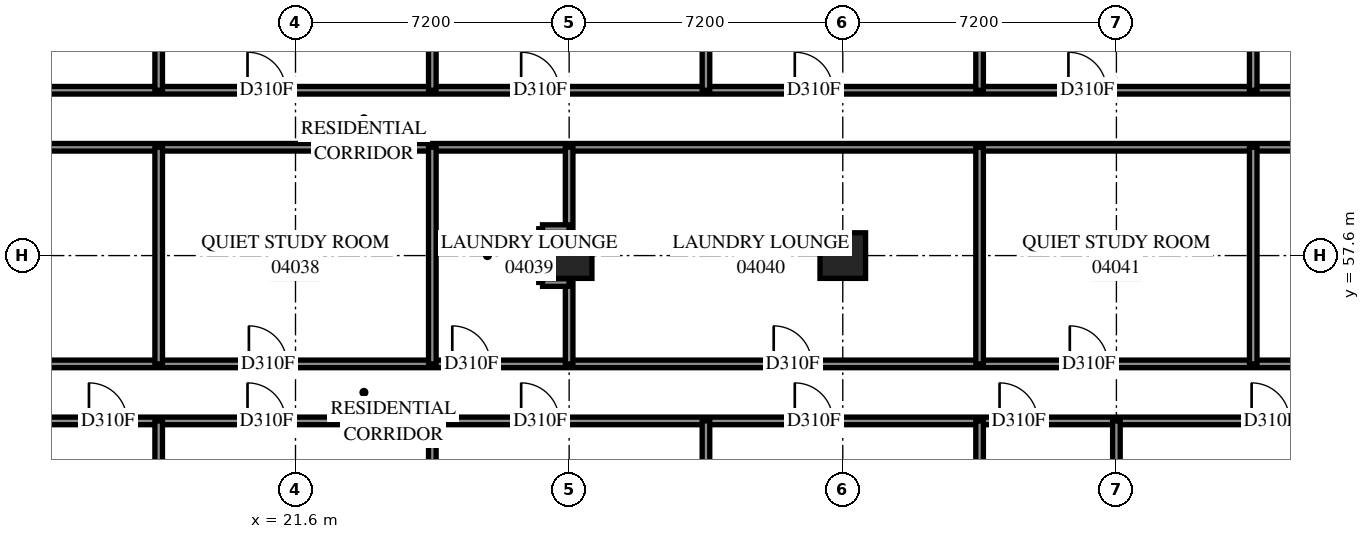
"""IFC4 building model, lengths in metres.
Left out: names, types, materials, properties, quantities, classifications, styles, units other than length and angle.
Written with IfcOpenShell. Run it as: python <this file> out.ifc"""

import sys

from ifc_helpers import new_model, si_unit, direction, frame, frame_2d, origin, origin_2d, place, context, subcontext, project, spatial, rectangle, extrude, element, fill, save


model = new_model("IFC4")
c1 = context("Model", 3, precision=1e-05, world=origin(), true_north=direction((0.0, 1.0)))
c2 = subcontext(c1, "Body", "Model", "MODEL_VIEW")
j1 = project(units=[si_unit("LENGTHUNIT", "METRE"), si_unit("PLANEANGLEUNIT", "RADIAN")], contexts=[c1])
p1 = place(None, origin())
s1 = spatial("IfcSite", under=j1, at=p1, CompositionType="ELEMENT")
p2 = place(p1, origin())
s2 = spatial("IfcBuilding", under=s1, at=p2, CompositionType="ELEMENT")
p3 = place(p2, frame((0.0, 0.0, 18.6)))
s3 = spatial("IfcBuildingStorey", under=s2, at=p3, CompositionType="ELEMENT", Elevation=18.6)
for number, where, z_axis, x_axis in (
    (1, (21.6, 57.6, 0.0), (0.0, 0.0, 1.0), (1.0, 0.0, 0.0)),
    (2, (28.8, 57.6, 0.0), (0.0, 0.0, 1.0), (1.0, 0.0, 0.0)),
    (3, (36.0, 57.6, 0.0), (0.0, 0.0, 1.0), (1.0, 0.0, 0.0)),
    (4, (43.2, 57.6, 0.0), (0.0, 0.0, 1.0), (1.0, 0.0, 0.0)),
):
    element("IfcColumn", number, at=place(p3, frame(where, z_axis=z_axis, x_axis=x_axis)), inside=s3, PredefinedType="COLUMN", context=c2, shape_type="SweptSolid", body=[
        extrude(rectangle(XDim=1.2, YDim=1.2, at=origin_2d()), origin(), (0.0, 0.0, 1.0), 3.8),
    ])
p4 = place(p3, frame((0.0, 53.25, 0.0), z_axis=(0.0, 0.0, 1.0), x_axis=(1.0, 0.0, 0.0)))
e5 = element("IfcWall", 5, at=p4, inside=s3, PredefinedType="PARTITIONING", context=c2, shape_type="SweptSolid", body=[
    extrude(rectangle(XDim=55.1, YDim=0.2, at=frame_2d((27.55, 0.0))), origin(), (0.0, 0.0, 1.0), 3.8),
])
p5 = place(p4, frame((8.669, 0.0, 0.0)))
e6 = element("IfcOpeningElement", 6, at=p5, cuts=e5, PredefinedType="OPENING", context=c2, shape_type="SweptSolid", body=[
    extrude(rectangle(XDim=1.0, YDim=2.1, at=frame_2d((0.5, 1.05))), frame((0.0, 0.11, 0.0), z_axis=(0.0, -1.0, 0.0), x_axis=(1.0, 0.0, 0.0)), (0.0, 0.0, 1.0), 0.22),
])
p6 = place(p4, frame((11.635, 0.0, 0.0)))
e7 = element("IfcOpeningElement", 7, at=p6, cuts=e5, PredefinedType="OPENING", context=c2, shape_type="SweptSolid", body=[
    extrude(rectangle(XDim=1.0, YDim=2.1, at=frame_2d((0.5, 1.05))), frame((0.0, 0.11, 0.0), z_axis=(0.0, -1.0, 0.0), x_axis=(1.0, 0.0, 0.0)), (0.0, 0.0, 1.0), 0.22),
])
p7 = place(p4, frame((16.165, 0.0, 0.0)))
e8 = element("IfcOpeningElement", 8, at=p7, cuts=e5, PredefinedType="OPENING", context=c2, shape_type="SweptSolid", body=[
    extrude(rectangle(XDim=1.0, YDim=2.1, at=frame_2d((0.5, 1.05))), frame((0.0, 0.11, 0.0), z_axis=(0.0, -1.0, 0.0), x_axis=(1.0, 0.0, 0.0)), (0.0, 0.0, 1.0), 0.22),
])
p8 = place(p4, frame((20.337, 0.0, 0.0)))
e9 = element("IfcOpeningElement", 9, at=p8, cuts=e5, PredefinedType="OPENING", context=c2, shape_type="SweptSolid", body=[
    extrude(rectangle(XDim=1.0, YDim=2.1, at=frame_2d((0.5, 1.05))), frame((0.0, 0.11, 0.0), z_axis=(0.0, -1.0, 0.0), x_axis=(1.0, 0.0, 0.0)), (0.0, 0.0, 1.0), 0.22),
])
p9 = place(p4, frame((27.538, 0.0, 0.0)))
e10 = element("IfcOpeningElement", 10, at=p9, cuts=e5, PredefinedType="OPENING", context=c2, shape_type="SweptSolid", body=[
    extrude(rectangle(XDim=1.0, YDim=2.1, at=frame_2d((0.5, 1.05))), frame((0.0, 0.11, 0.0), z_axis=(0.0, -1.0, 0.0), x_axis=(1.0, 0.0, 0.0)), (0.0, 0.0, 1.0), 0.22),
])
p10 = place(p4, frame((34.737, 0.0, 0.0)))
e11 = element("IfcOpeningElement", 11, at=p10, cuts=e5, PredefinedType="OPENING", context=c2, shape_type="SweptSolid", body=[
    extrude(rectangle(XDim=1.0, YDim=2.1, at=frame_2d((0.5, 1.05))), frame((0.0, 0.11, 0.0), z_axis=(0.0, -1.0, 0.0), x_axis=(1.0, 0.0, 0.0)), (0.0, 0.0, 1.0), 0.22),
])
p11 = place(p4, frame((40.125, 0.0, 0.0)))
e12 = element("IfcOpeningElement", 12, at=p11, cuts=e5, PredefinedType="OPENING", context=c2, shape_type="SweptSolid", body=[
    extrude(rectangle(XDim=1.0, YDim=2.1, at=frame_2d((0.5, 1.05))), frame((0.0, 0.11, 0.0), z_axis=(0.0, -1.0, 0.0), x_axis=(1.0, 0.0, 0.0)), (0.0, 0.0, 1.0), 0.22),
])
p12 = place(p4, frame((46.758, 0.0, 0.0)))
e13 = element("IfcOpeningElement", 13, at=p12, cuts=e5, PredefinedType="OPENING", context=c2, shape_type="SweptSolid", body=[
    extrude(rectangle(XDim=1.0, YDim=2.1, at=frame_2d((0.5, 1.05))), frame((0.0, 0.11, 0.0), z_axis=(0.0, -1.0, 0.0), x_axis=(1.0, 0.0, 0.0)), (0.0, 0.0, 1.0), 0.22),
])
p13 = place(p4, frame((53.913, 0.0, 0.0)))
e14 = element("IfcOpeningElement", 14, at=p13, cuts=e5, PredefinedType="OPENING", context=c2, shape_type="SweptSolid", body=[
    extrude(rectangle(XDim=1.0, YDim=2.1, at=frame_2d((0.5, 1.05))), frame((0.0, 0.11, 0.0), z_axis=(0.0, -1.0, 0.0), x_axis=(1.0, 0.0, 0.0)), (0.0, 0.0, 1.0), 0.22),
])
p14 = place(p4, frame((2.672, 0.0, 0.0)))
e15 = element("IfcOpeningElement", 15, at=p14, cuts=e5, PredefinedType="OPENING", context=c2, shape_type="SweptSolid", body=[
    extrude(rectangle(XDim=1.0, YDim=2.1, at=frame_2d((0.5, 1.05))), frame((0.0, 0.11, 0.0), z_axis=(0.0, -1.0, 0.0), x_axis=(1.0, 0.0, 0.0)), (0.0, 0.0, 1.0), 0.22),
])
p15 = place(p4, frame((4.788, 0.0, 0.0)))
e16 = element("IfcOpeningElement", 16, at=p15, cuts=e5, PredefinedType="OPENING", context=c2, shape_type="SweptSolid", body=[
    extrude(rectangle(XDim=1.0, YDim=2.1, at=frame_2d((0.5, 1.05))), frame((0.0, 0.11, 0.0), z_axis=(0.0, -1.0, 0.0), x_axis=(1.0, 0.0, 0.0)), (0.0, 0.0, 1.0), 0.22),
])
p16 = place(p3, frame((0.002, 60.45, 0.0), z_axis=(0.0, 0.0, 1.0), x_axis=(1.0, 0.0, 0.0)))
e17 = element("IfcWall", 17, at=p16, inside=s3, PredefinedType="PARTITIONING", context=c2, shape_type="SweptSolid", body=[
    extrude(rectangle(XDim=55.098, YDim=0.2, at=frame_2d((27.549, 0.0))), origin(), (0.0, 0.0, 1.0), 3.8),
])
p17 = place(p16, frame((49.69, 0.0, 0.0)))
e18 = element("IfcOpeningElement", 18, at=p17, cuts=e17, PredefinedType="OPENING", context=c2, shape_type="SweptSolid", body=[
    extrude(rectangle(XDim=1.0, YDim=2.1, at=frame_2d((0.5, 1.05))), frame((0.0, 0.11, 0.0), z_axis=(0.0, -1.0, 0.0), x_axis=(1.0, 0.0, 0.0)), (0.0, 0.0, 1.0), 0.22),
])
p18 = place(p16, frame((3.897, 0.0, 0.0)))
e19 = element("IfcOpeningElement", 19, at=p18, cuts=e17, PredefinedType="OPENING", context=c2, shape_type="SweptSolid", body=[
    extrude(rectangle(XDim=1.0, YDim=2.1, at=frame_2d((0.5, 1.05))), frame((0.0, 0.11, 0.0), z_axis=(0.0, -1.0, 0.0), x_axis=(1.0, 0.0, 0.0)), (0.0, 0.0, 1.0), 0.22),
])
p19 = place(p3, frame((0.002, 61.95, 0.0), z_axis=(0.0, 0.0, 1.0), x_axis=(1.0, 0.0, 0.0)))
e20 = element("IfcWall", 20, at=p19, inside=s3, PredefinedType="PARTITIONING", context=c2, shape_type="SweptSolid", body=[
    extrude(rectangle(XDim=55.098, YDim=0.2, at=frame_2d((27.549, 0.0))), origin(), (0.0, 0.0, 1.0), 3.8),
])
p20 = place(p19, frame((8.667, 0.0, 0.0)))
e21 = element("IfcOpeningElement", 21, at=p20, cuts=e20, PredefinedType="OPENING", context=c2, shape_type="SweptSolid", body=[
    extrude(rectangle(XDim=1.0, YDim=2.1, at=frame_2d((0.5, 1.05))), frame((0.0, 0.11, 0.0), z_axis=(0.0, -1.0, 0.0), x_axis=(1.0, 0.0, 0.0)), (0.0, 0.0, 1.0), 0.22),
])
p21 = place(p19, frame((13.136, 0.0, 0.0)))
e22 = element("IfcOpeningElement", 22, at=p21, cuts=e20, PredefinedType="OPENING", context=c2, shape_type="SweptSolid", body=[
    extrude(rectangle(XDim=1.0, YDim=2.1, at=frame_2d((0.5, 1.05))), frame((0.0, 0.11, 0.0), z_axis=(0.0, -1.0, 0.0), x_axis=(1.0, 0.0, 0.0)), (0.0, 0.0, 1.0), 0.22),
])
p22 = place(p19, frame((20.335, 0.0, 0.0)))
e23 = element("IfcOpeningElement", 23, at=p22, cuts=e20, PredefinedType="OPENING", context=c2, shape_type="SweptSolid", body=[
    extrude(rectangle(XDim=1.0, YDim=2.1, at=frame_2d((0.5, 1.05))), frame((0.0, 0.11, 0.0), z_axis=(0.0, -1.0, 0.0), x_axis=(1.0, 0.0, 0.0)), (0.0, 0.0, 1.0), 0.22),
])
p23 = place(p19, frame((27.535, 0.0, 0.0)))
e24 = element("IfcOpeningElement", 24, at=p23, cuts=e20, PredefinedType="OPENING", context=c2, shape_type="SweptSolid", body=[
    extrude(rectangle(XDim=1.0, YDim=2.1, at=frame_2d((0.5, 1.05))), frame((0.0, 0.11, 0.0), z_axis=(0.0, -1.0, 0.0), x_axis=(1.0, 0.0, 0.0)), (0.0, 0.0, 1.0), 0.22),
])
p24 = place(p19, frame((34.736, 0.0, 0.0)))
e25 = element("IfcOpeningElement", 25, at=p24, cuts=e20, PredefinedType="OPENING", context=c2, shape_type="SweptSolid", body=[
    extrude(rectangle(XDim=1.0, YDim=2.1, at=frame_2d((0.5, 1.05))), frame((0.0, 0.11, 0.0), z_axis=(0.0, -1.0, 0.0), x_axis=(1.0, 0.0, 0.0)), (0.0, 0.0, 1.0), 0.22),
])
p25 = place(p19, frame((41.935, 0.0, 0.0)))
e26 = element("IfcOpeningElement", 26, at=p25, cuts=e20, PredefinedType="OPENING", context=c2, shape_type="SweptSolid", body=[
    extrude(rectangle(XDim=1.0, YDim=2.1, at=frame_2d((0.5, 1.05))), frame((0.0, 0.11, 0.0), z_axis=(0.0, -1.0, 0.0), x_axis=(1.0, 0.0, 0.0)), (0.0, 0.0, 1.0), 0.22),
])
p26 = place(p19, frame((49.136, 0.0, 0.0)))
e27 = element("IfcOpeningElement", 27, at=p26, cuts=e20, PredefinedType="OPENING", context=c2, shape_type="SweptSolid", body=[
    extrude(rectangle(XDim=1.0, YDim=2.1, at=frame_2d((0.5, 1.05))), frame((0.0, 0.11, 0.0), z_axis=(0.0, -1.0, 0.0), x_axis=(1.0, 0.0, 0.0)), (0.0, 0.0, 1.0), 0.22),
])
p27 = place(p19, frame((4.799, 0.0, 0.0)))
e28 = element("IfcOpeningElement", 28, at=p27, cuts=e20, PredefinedType="OPENING", context=c2, shape_type="SweptSolid", body=[
    extrude(rectangle(XDim=1.0, YDim=2.1, at=frame_2d((0.5, 1.05))), frame((0.0, 0.11, 0.0), z_axis=(0.0, -1.0, 0.0), x_axis=(1.0, 0.0, 0.0)), (0.0, 0.0, 1.0), 0.22),
])
p28 = place(p3, frame((6.0, 54.75, 0.0), z_axis=(0.0, 0.0, 1.0), x_axis=(1.0, 0.0, 0.0)))
e29 = element("IfcWall", 29, at=p28, inside=s3, PredefinedType="PARTITIONING", context=c2, shape_type="SweptSolid", body=[
    extrude(rectangle(XDim=49.1, YDim=0.2, at=frame_2d((24.55, 0.0))), origin(), (0.0, 0.0, 1.0), 3.8),
])
p29 = place(p28, frame((6.284, 0.0, 0.0)))
e30 = element("IfcOpeningElement", 30, at=p29, cuts=e29, PredefinedType="OPENING", context=c2, shape_type="SweptSolid", body=[
    extrude(rectangle(XDim=1.0, YDim=2.1, at=frame_2d((0.5, 1.05))), frame((0.0, 0.11, 0.0), z_axis=(0.0, -1.0, 0.0), x_axis=(1.0, 0.0, 0.0)), (0.0, 0.0, 1.0), 0.22),
])
p30 = place(p28, frame((14.374, 0.0, 0.0)))
e31 = element("IfcOpeningElement", 31, at=p30, cuts=e29, PredefinedType="OPENING", context=c2, shape_type="SweptSolid", body=[
    extrude(rectangle(XDim=1.0, YDim=2.1, at=frame_2d((0.5, 1.05))), frame((0.0, 0.11, 0.0), z_axis=(0.0, -1.0, 0.0), x_axis=(1.0, 0.0, 0.0)), (0.0, 0.0, 1.0), 0.22),
])
p31 = place(p28, frame((19.725, 0.0, 0.0)))
e32 = element("IfcOpeningElement", 32, at=p31, cuts=e29, PredefinedType="OPENING", context=c2, shape_type="SweptSolid", body=[
    extrude(rectangle(XDim=1.0, YDim=2.1, at=frame_2d((0.5, 1.05))), frame((0.0, 0.11, 0.0), z_axis=(0.0, -1.0, 0.0), x_axis=(1.0, 0.0, 0.0)), (0.0, 0.0, 1.0), 0.22),
])
p32 = place(p28, frame((28.183, 0.0, 0.0)))
e33 = element("IfcOpeningElement", 33, at=p32, cuts=e29, PredefinedType="OPENING", context=c2, shape_type="SweptSolid", body=[
    extrude(rectangle(XDim=1.0, YDim=2.1, at=frame_2d((0.5, 1.05))), frame((0.0, 0.11, 0.0), z_axis=(0.0, -1.0, 0.0), x_axis=(1.0, 0.0, 0.0)), (0.0, 0.0, 1.0), 0.22),
])
p33 = place(p28, frame((35.974, 0.0, 0.0)))
e34 = element("IfcOpeningElement", 34, at=p33, cuts=e29, PredefinedType="OPENING", context=c2, shape_type="SweptSolid", body=[
    extrude(rectangle(XDim=1.0, YDim=2.1, at=frame_2d((0.5, 1.05))), frame((0.0, 0.11, 0.0), z_axis=(0.0, -1.0, 0.0), x_axis=(1.0, 0.0, 0.0)), (0.0, 0.0, 1.0), 0.22),
])
for number, where, z_axis, x_axis in (
    (35, (18.0, 42.0, 0.0), (0.0, 0.0, 1.0), (0.0, 1.0, 0.0)),
    (36, (25.2, 42.0, 0.0), (0.0, 0.0, 1.0), (0.0, 1.0, 0.0)),
    (37, (32.4, 42.0, 0.0), (0.0, 0.0, 1.0), (0.0, 1.0, 0.0)),
    (38, (39.6, 42.0, 0.0), (0.0, 0.0, 1.0), (0.0, 1.0, 0.0)),
):
    element("IfcWall", number, at=place(p3, frame(where, z_axis=z_axis, x_axis=x_axis)), inside=s3, PredefinedType="PARTITIONING", context=c2, shape_type="SweptSolid", body=[
        extrude(rectangle(XDim=11.25, YDim=0.2, at=frame_2d((5.625, 0.0))), origin(), (0.0, 0.0, 1.0), 3.8),
    ])
for number, where, z_axis, x_axis in (
    (39, (18.0, 61.95, 0.0), (0.0, 0.0, 1.0), (0.0, 1.0, 0.0)),
    (40, (25.2, 61.95, 0.0), (0.0, 0.0, 1.0), (0.0, 1.0, 0.0)),
    (41, (32.4, 61.95, 0.0), (0.0, 0.0, 1.0), (0.0, 1.0, 0.0)),
    (42, (39.6, 61.95, 0.0), (0.0, 0.0, 1.0), (0.0, 1.0, 0.0)),
    (43, (46.8, 61.95, 0.0), (0.0, 0.0, 1.0), (0.0, 1.0, 0.0)),
):
    element("IfcWall", number, at=place(p3, frame(where, z_axis=z_axis, x_axis=x_axis)), inside=s3, PredefinedType="PARTITIONING", context=c2, shape_type="SweptSolid", body=[
        extrude(rectangle(XDim=10.7, YDim=0.2, at=frame_2d((5.35, 0.0))), origin(), (0.0, 0.0, 1.0), 3.8),
    ])
for number, where, z_axis, x_axis in (
    (44, (18.0, 54.75, 0.0), (0.0, 0.0, 1.0), (0.0, 1.0, 0.0)),
    (45, (25.2, 54.75, 0.0), (0.0, 0.0, 1.0), (0.0, 1.0, 0.0)),
    (46, (39.6, 54.75, 0.0), (0.0, 0.0, 1.0), (0.0, 1.0, 0.0)),
    (47, (46.8, 54.75, 0.0), (0.0, 0.0, 1.0), (0.0, 1.0, 0.0)),
):
    element("IfcWall", number, at=place(p3, frame(where, z_axis=z_axis, x_axis=x_axis)), inside=s3, PredefinedType="PARTITIONING", context=c2, shape_type="SweptSolid", body=[
        extrude(rectangle(XDim=5.7, YDim=0.2, at=frame_2d((2.85, 0.0))), origin(), (0.0, 0.0, 1.0), 3.8),
    ])
for number, where, z_axis, x_axis in (
    (48, (28.8, 58.306, 0.0), (0.0, 0.0, 1.0), (0.0, 1.0, 0.0)),
    (49, (28.8, 54.75, 0.0), (0.0, 0.0, 1.0), (0.0, 1.0, 0.0)),
    (50, (43.2, 51.106, 0.0), (0.0, 0.0, 1.0), (0.0, 1.0, 0.0)),
):
    element("IfcWall", number, at=place(p3, frame(where, z_axis=z_axis, x_axis=x_axis)), inside=s3, PredefinedType="PARTITIONING", context=c2, shape_type="SweptSolid", body=[
        extrude(rectangle(XDim=2.144, YDim=0.2, at=frame_2d((1.072, 0.0))), origin(), (0.0, 0.0, 1.0), 3.8),
    ])
p34 = place(p3, frame((28.1, 56.894, 0.0), z_axis=(0.0, 0.0, 1.0), x_axis=(0.0, 1.0, 0.0)))
e51 = element("IfcWall", 51, at=p34, inside=s3, PredefinedType="PARTITIONING", context=c2, shape_type="SweptSolid", body=[
    extrude(rectangle(XDim=1.412, YDim=0.2, at=frame_2d((0.706, 0.0))), origin(), (0.0, 0.0, 1.0), 3.8),
])
for number, where, z_axis, x_axis in (
    (52, (28.1, 58.31, 0.0), (0.0, 0.0, 1.0), (1.0, 0.0, 0.0)),
    (53, (28.1, 56.89, 0.0), (0.0, 0.0, 1.0), (1.0, 0.0, 0.0)),
):
    element("IfcWall", number, at=place(p3, frame(where, z_axis=z_axis, x_axis=x_axis)), inside=s3, PredefinedType="PARTITIONING", context=c2, shape_type="SweptSolid", body=[
        extrude(rectangle(XDim=0.7, YDim=0.2, at=frame_2d((0.35, 0.0))), origin(), (0.0, 0.0, 1.0), 3.8),
    ])
p35 = place(p7, origin())
e54 = element("IfcDoor", 54, at=p35, inside=s3, OperationType="SINGLE_SWING_LEFT", PredefinedType="DOOR", context=c2, shape_type="SweptSolid", body=[
    extrude(rectangle(XDim=1.0, YDim=2.1, at=frame_2d((0.5, 1.05))), frame((0.0, 0.025, 0.0), z_axis=(0.0, -1.0, 0.0), x_axis=(1.0, 0.0, 0.0)), (0.0, 0.0, 1.0), 0.05),
])
fill(e8, e54)
p36 = place(p8, origin())
e55 = element("IfcDoor", 55, at=p36, inside=s3, OperationType="SINGLE_SWING_RIGHT", PredefinedType="DOOR", context=c2, shape_type="SweptSolid", body=[
    extrude(rectangle(XDim=1.0, YDim=2.1, at=frame_2d((0.5, 1.05))), frame((0.0, 0.025, 0.0), z_axis=(0.0, -1.0, 0.0), x_axis=(1.0, 0.0, 0.0)), (0.0, 0.0, 1.0), 0.05),
])
fill(e9, e55)
p37 = place(p9, origin())
e56 = element("IfcDoor", 56, at=p37, inside=s3, OperationType="SINGLE_SWING_RIGHT", PredefinedType="DOOR", context=c2, shape_type="SweptSolid", body=[
    extrude(rectangle(XDim=1.0, YDim=2.1, at=frame_2d((0.5, 1.05))), frame((0.0, 0.025, 0.0), z_axis=(0.0, -1.0, 0.0), x_axis=(1.0, 0.0, 0.0)), (0.0, 0.0, 1.0), 0.05),
])
fill(e10, e56)
p38 = place(p10, origin())
e57 = element("IfcDoor", 57, at=p38, inside=s3, OperationType="SINGLE_SWING_RIGHT", PredefinedType="DOOR", context=c2, shape_type="SweptSolid", body=[
    extrude(rectangle(XDim=1.0, YDim=2.1, at=frame_2d((0.5, 1.05))), frame((0.0, 0.025, 0.0), z_axis=(0.0, -1.0, 0.0), x_axis=(1.0, 0.0, 0.0)), (0.0, 0.0, 1.0), 0.05),
])
fill(e11, e57)
p39 = place(p11, origin())
e58 = element("IfcDoor", 58, at=p39, inside=s3, OperationType="SINGLE_SWING_RIGHT", PredefinedType="DOOR", context=c2, shape_type="SweptSolid", body=[
    extrude(rectangle(XDim=1.0, YDim=2.1, at=frame_2d((0.5, 1.05))), frame((0.0, 0.025, 0.0), z_axis=(0.0, -1.0, 0.0), x_axis=(1.0, 0.0, 0.0)), (0.0, 0.0, 1.0), 0.05),
])
fill(e12, e58)
p40 = place(p12, origin())
e59 = element("IfcDoor", 59, at=p40, inside=s3, OperationType="SINGLE_SWING_LEFT", PredefinedType="DOOR", context=c2, shape_type="SweptSolid", body=[
    extrude(rectangle(XDim=1.0, YDim=2.1, at=frame_2d((0.5, 1.05))), frame((0.0, 0.025, 0.0), z_axis=(0.0, -1.0, 0.0), x_axis=(1.0, 0.0, 0.0)), (0.0, 0.0, 1.0), 0.05),
])
fill(e13, e59)
p41 = place(p30, origin())
e60 = element("IfcDoor", 60, at=p41, inside=s3, OperationType="SINGLE_SWING_LEFT", PredefinedType="DOOR", context=c2, shape_type="SweptSolid", body=[
    extrude(rectangle(XDim=1.0, YDim=2.1, at=frame_2d((0.5, 1.05))), frame((0.0, 0.025, 0.0), z_axis=(0.0, -1.0, 0.0), x_axis=(1.0, 0.0, 0.0)), (0.0, 0.0, 1.0), 0.05),
])
fill(e31, e60)
p42 = place(p31, origin())
e61 = element("IfcDoor", 61, at=p42, inside=s3, OperationType="SINGLE_SWING_LEFT", PredefinedType="DOOR", context=c2, shape_type="SweptSolid", body=[
    extrude(rectangle(XDim=1.0, YDim=2.1, at=frame_2d((0.5, 1.05))), frame((0.0, 0.025, 0.0), z_axis=(0.0, -1.0, 0.0), x_axis=(1.0, 0.0, 0.0)), (0.0, 0.0, 1.0), 0.05),
])
fill(e32, e61)
p43 = place(p32, origin())
e62 = element("IfcDoor", 62, at=p43, inside=s3, OperationType="SINGLE_SWING_RIGHT", PredefinedType="DOOR", context=c2, shape_type="SweptSolid", body=[
    extrude(rectangle(XDim=1.0, YDim=2.1, at=frame_2d((0.5, 1.05))), frame((0.0, 0.025, 0.0), z_axis=(0.0, -1.0, 0.0), x_axis=(1.0, 0.0, 0.0)), (0.0, 0.0, 1.0), 0.05),
])
fill(e33, e62)
p44 = place(p33, origin())
e63 = element("IfcDoor", 63, at=p44, inside=s3, OperationType="SINGLE_SWING_LEFT", PredefinedType="DOOR", context=c2, shape_type="SweptSolid", body=[
    extrude(rectangle(XDim=1.0, YDim=2.1, at=frame_2d((0.5, 1.05))), frame((0.0, 0.025, 0.0), z_axis=(0.0, -1.0, 0.0), x_axis=(1.0, 0.0, 0.0)), (0.0, 0.0, 1.0), 0.05),
])
fill(e34, e63)
p45 = place(p22, origin())
e64 = element("IfcDoor", 64, at=p45, inside=s3, OperationType="SINGLE_SWING_LEFT", PredefinedType="DOOR", context=c2, shape_type="SweptSolid", body=[
    extrude(rectangle(XDim=1.0, YDim=2.1, at=frame_2d((0.5, 1.05))), frame((0.0, 0.025, 0.0), z_axis=(0.0, -1.0, 0.0), x_axis=(1.0, 0.0, 0.0)), (0.0, 0.0, 1.0), 0.05),
])
fill(e23, e64)
p46 = place(p23, origin())
e65 = element("IfcDoor", 65, at=p46, inside=s3, OperationType="SINGLE_SWING_LEFT", PredefinedType="DOOR", context=c2, shape_type="SweptSolid", body=[
    extrude(rectangle(XDim=1.0, YDim=2.1, at=frame_2d((0.5, 1.05))), frame((0.0, 0.025, 0.0), z_axis=(0.0, -1.0, 0.0), x_axis=(1.0, 0.0, 0.0)), (0.0, 0.0, 1.0), 0.05),
])
fill(e24, e65)
p47 = place(p24, origin())
e66 = element("IfcDoor", 66, at=p47, inside=s3, OperationType="SINGLE_SWING_LEFT", PredefinedType="DOOR", context=c2, shape_type="SweptSolid", body=[
    extrude(rectangle(XDim=1.0, YDim=2.1, at=frame_2d((0.5, 1.05))), frame((0.0, 0.025, 0.0), z_axis=(0.0, -1.0, 0.0), x_axis=(1.0, 0.0, 0.0)), (0.0, 0.0, 1.0), 0.05),
])
fill(e25, e66)
p48 = place(p25, origin())
e67 = element("IfcDoor", 67, at=p48, inside=s3, OperationType="SINGLE_SWING_LEFT", PredefinedType="DOOR", context=c2, shape_type="SweptSolid", body=[
    extrude(rectangle(XDim=1.0, YDim=2.1, at=frame_2d((0.5, 1.05))), frame((0.0, 0.025, 0.0), z_axis=(0.0, -1.0, 0.0), x_axis=(1.0, 0.0, 0.0)), (0.0, 0.0, 1.0), 0.05),
])
fill(e26, e67)
save(model, sys.argv[1])
